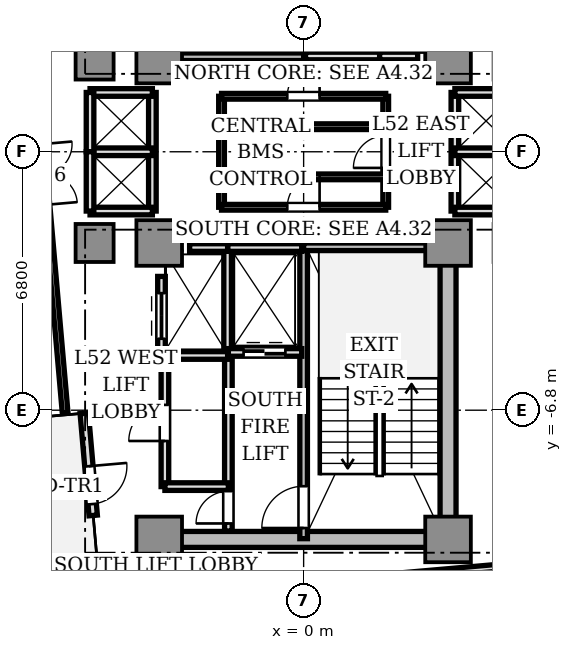
"""IFC4 building model, lengths in metres.
Left out: names, types, materials, properties, quantities, classifications, styles, units other than length and angle.
Written with IfcOpenShell. Run it as: python <this file> out.ifc"""

import sys

from ifc_helpers import new_model, si_unit, direction, frame, frame_2d, origin, origin_2d, place, context, subcontext, project, spatial, rectangle, extrude, source, transform, mapped, element, fill, save


model = new_model("IFC4")
c1 = context("Model", 3, precision=1e-05, world=origin(), true_north=direction((0.0, 1.0)))
c2 = subcontext(c1, "Body", "Model", "MODEL_VIEW")
j1 = project(units=[si_unit("LENGTHUNIT", "METRE"), si_unit("PLANEANGLEUNIT", "RADIAN")], contexts=[c1])
p1 = place(None, origin())
s1 = spatial("IfcSite", under=j1, at=p1, CompositionType="ELEMENT")
p2 = place(p1, origin())
s2 = spatial("IfcBuilding", under=s1, at=p2, CompositionType="ELEMENT")
p3 = place(p2, frame((0.0, 0.0, 188.6)))
s3 = spatial("IfcBuildingStorey", under=s2, at=p3, CompositionType="ELEMENT", Elevation=188.6)
p4 = place(p3, frame((-3.55, -10.2, 0.0), z_axis=(0.0, 0.0, 1.0), x_axis=(1.0, 0.0, 0.0)))
e1 = element("IfcWall", 1, at=p4, inside=s3, PredefinedType="SHEAR", context=c2, shape_type="SweptSolid", body=[
    extrude(rectangle(XDim=7.1, YDim=0.42, at=frame_2d((3.55, 0.0))), origin(), (0.0, 0.0, 1.0), 3.11),
])
p5 = place(p3, frame((3.8, -9.75, 0.0), z_axis=(0.0, 0.0, 1.0), x_axis=(0.0, 1.0, 0.0)))
e2 = element("IfcWall", 2, at=p5, inside=s3, PredefinedType="SHEAR", context=c2, shape_type="SweptSolid", body=[
    extrude(rectangle(XDim=6.9, YDim=0.42, at=frame_2d((3.45, 0.0))), origin(), (0.0, 0.0, 1.0), 3.11),
])
m1 = source(origin(), c2, "Body", "SweptSolid", [
    extrude(rectangle(XDim=1.2, YDim=1.2, at=origin_2d()), origin(), (0.0, 0.0, 1.0), 3.11),
])
for number, where, z_axis, x_axis in (
    (3, (-3.8, 2.4, 0.0), (0.0, 0.0, 1.0), (1.0, 0.0, 0.0)),
    (4, (3.8, 2.4, 0.0), (0.0, 0.0, 1.0), (1.0, 0.0, 0.0)),
    (5, (-3.8, -2.4, 0.0), (0.0, 0.0, 1.0), (1.0, 0.0, 0.0)),
    (6, (3.8, -2.4, 0.0), (0.0, 0.0, 1.0), (1.0, 0.0, 0.0)),
    (7, (-3.8, -10.2, 0.0), (0.0, 0.0, 1.0), (1.0, 0.0, 0.0)),
    (8, (3.8, -10.2, 0.0), (0.0, 0.0, 1.0), (1.0, 0.0, 0.0)),
):
    element("IfcColumn", number, at=place(p3, frame(where, z_axis=z_axis, x_axis=x_axis)), inside=s3, PredefinedType="COLUMN", context=c2, shape_type="MappedRepresentation", body=[
        mapped(m1, transform((0.0, 0.0, 0.0), scale=1.0)),
    ])
m2 = source(origin(), c2, "Body", "SweptSolid", [
    extrude(rectangle(XDim=1.0, YDim=1.0, at=origin_2d()), origin(), (0.0, 0.0, 1.0), 3.11),
])
for number, where, z_axis, x_axis in (
    (9, (-5.5, 2.4, 0.0), (0.0, 0.0, 1.0), (1.0, 0.0, 0.0)),
    (10, (-5.5, -2.4, 0.0), (0.0, 0.0, 1.0), (1.0, 0.0, 0.0)),
):
    element("IfcColumn", number, at=place(p3, frame(where, z_axis=z_axis, x_axis=x_axis)), inside=s3, PredefinedType="COLUMN", context=c2, shape_type="MappedRepresentation", body=[
        mapped(m2, transform((0.0, 0.0, 0.0), scale=1.0)),
    ])
p6 = place(p3, frame((-5.772, -6.879, 0.0), z_axis=(0.0, 0.0, 1.0), x_axis=(0.087168071984, -0.996193619346, 0.0)))
e11 = element("IfcWall", 11, at=p6, inside=s3, PredefinedType="STANDARD", context=c2, shape_type="SweptSolid", body=[
    extrude(rectangle(XDim=2.7, YDim=0.22, at=frame_2d((1.35, 0.0))), origin(), (0.0, 0.0, 1.0), 3.11),
])
p7 = place(p6, frame((1.4, 0.0, 0.0)))
e12 = element("IfcOpeningElement", 12, at=p7, cuts=e11, PredefinedType="OPENING", context=c2, shape_type="SweptSolid", body=[
    extrude(rectangle(XDim=1.0, YDim=2.2, at=frame_2d((0.5, 1.1))), frame((0.0, 0.12, 0.0), z_axis=(0.0, -1.0, 0.0), x_axis=(1.0, 0.0, 0.0)), (0.0, 0.0, 1.0), 0.24),
])
p8 = place(p3, frame((0.0, 2.5, 0.0), z_axis=(0.0, 0.0, 1.0), x_axis=(0.0, 1.0, 0.0)))
e13 = element("IfcWall", 13, at=p8, inside=s3, PredefinedType="SOLIDWALL", context=c2, shape_type="SweptSolid", body=[
    extrude(rectangle(XDim=7.68, YDim=0.2, at=frame_2d((3.84, 0.0))), origin(), (0.0, 0.0, 1.0), 3.11),
])
p9 = place(p8, frame((6.36, 0.0, 0.0)))
e14 = element("IfcOpeningElement", 14, at=p9, cuts=e13, PredefinedType="OPENING", context=c2, shape_type="SweptSolid", body=[
    extrude(rectangle(XDim=1.1, YDim=2.15, at=frame_2d((0.55, 1.075))), frame((0.0, 0.11, 0.0), z_axis=(0.0, -1.0, 0.0), x_axis=(1.0, 0.0, 0.0)), (0.0, 0.0, 1.0), 0.22),
])
p10 = place(p3, frame((-3.72, 2.5, 0.0), z_axis=(0.0, 0.0, 1.0), x_axis=(1.0, 0.0, 0.0)))
e15 = element("IfcWall", 15, at=p10, inside=s3, PredefinedType="SOLIDWALL", context=c2, shape_type="SweptSolid", body=[
    extrude(rectangle(XDim=3.72, YDim=0.2, at=frame_2d((1.86, 0.0))), origin(), (0.0, 0.0, 1.0), 3.11),
])
p11 = place(p3, frame((0.0, -10.18, 0.0), z_axis=(0.0, 0.0, 1.0), x_axis=(0.0, 1.0, 0.0)))
e16 = element("IfcWall", 16, at=p11, inside=s3, PredefinedType="SOLIDWALL", context=c2, shape_type="SweptSolid", body=[
    extrude(rectangle(XDim=7.68, YDim=0.2, at=frame_2d((3.84, 0.0))), origin(), (0.0, 0.0, 1.0), 3.11),
])
p12 = place(p11, frame((0.28, 0.0, 0.0)))
e17 = element("IfcOpeningElement", 17, at=p12, cuts=e16, PredefinedType="OPENING", context=c2, shape_type="SweptSolid", body=[
    extrude(rectangle(XDim=1.1, YDim=2.15, at=frame_2d((0.55, 1.075))), frame((0.0, 0.11, 0.0), z_axis=(0.0, -1.0, 0.0), x_axis=(1.0, 0.0, 0.0)), (0.0, 0.0, 1.0), 0.22),
])
p13 = place(p3, frame((0.0, -2.5, 0.0), z_axis=(0.0, 0.0, 1.0), x_axis=(1.0, 0.0, 0.0)))
e18 = element("IfcWall", 18, at=p13, inside=s3, PredefinedType="SOLIDWALL", context=c2, shape_type="SweptSolid", body=[
    extrude(rectangle(XDim=3.72, YDim=0.2, at=frame_2d((1.86, 0.0))), origin(), (0.0, 0.0, 1.0), 3.11),
])
p14 = place(p3, frame((-1.98, -9.98, 0.0), z_axis=(0.0, 0.0, 1.0), x_axis=(0.0, 1.0, 0.0)))
e19 = element("IfcWall", 19, at=p14, inside=s3, PredefinedType="SOLIDWALL", context=c2, shape_type="SweptSolid", body=[
    extrude(rectangle(XDim=4.66, YDim=0.2, at=frame_2d((2.33, 0.0))), origin(), (0.0, 0.0, 1.0), 2.66),
])
p15 = place(p14, frame((0.2, 0.0, 0.0)))
e20 = element("IfcOpeningElement", 20, at=p15, cuts=e19, PredefinedType="OPENING", context=c2, shape_type="SweptSolid", body=[
    extrude(rectangle(XDim=0.85, YDim=2.1, at=frame_2d((0.425, 1.05))), frame((0.0, 0.11, 0.0), z_axis=(0.0, -1.0, 0.0), x_axis=(1.0, 0.0, 0.0)), (0.0, 0.0, 1.0), 0.22),
])
p16 = place(p3, frame((2.0, 2.5, 0.0), z_axis=(0.0, 0.0, 1.0), x_axis=(0.0, 1.0, 0.0)))
e21 = element("IfcWall", 21, at=p16, inside=s3, PredefinedType="SOLIDWALL", context=c2, shape_type="SweptSolid", body=[
    extrude(rectangle(XDim=2.78, YDim=0.2, at=frame_2d((1.39, 0.0))), origin(), (0.0, 0.0, 1.0), 2.66),
])
p17 = place(p3, frame((0.05, 2.52, 0.0), z_axis=(0.0, 0.0, 1.0), x_axis=(1.0, 0.0, 0.0)))
e22 = element("IfcWall", 22, at=p17, inside=s3, PredefinedType="SOLIDWALL", context=c2, shape_type="SweptSolid", body=[
    extrude(rectangle(XDim=1.95, YDim=0.2, at=frame_2d((0.975, 0.0))), origin(), (0.0, 0.0, 1.0), 2.66),
])
p18 = place(p3, frame((-2.0, -5.28, 0.0), z_axis=(0.0, 0.0, 1.0), x_axis=(0.0, 1.0, 0.0)))
e23 = element("IfcWall", 23, at=p18, inside=s3, PredefinedType="SOLIDWALL", context=c2, shape_type="SweptSolid", body=[
    extrude(rectangle(XDim=2.78, YDim=0.2, at=frame_2d((1.39, 0.0))), origin(), (0.0, 0.0, 1.0), 2.66),
])
p19 = place(p3, frame((-2.0, -2.52, 0.0), z_axis=(0.0, 0.0, 1.0), x_axis=(1.0, 0.0, 0.0)))
e24 = element("IfcWall", 24, at=p19, inside=s3, PredefinedType="SOLIDWALL", context=c2, shape_type="SweptSolid", body=[
    extrude(rectangle(XDim=1.95, YDim=0.2, at=frame_2d((0.975, 0.0))), origin(), (0.0, 0.0, 1.0), 2.66),
])
p20 = place(p3, frame((-1.98, -5.28, 0.0), z_axis=(0.0, 0.0, 1.0), x_axis=(1.0, 0.0, 0.0)))
e25 = element("IfcWall", 25, at=p20, inside=s3, PredefinedType="SOLIDWALL", context=c2, shape_type="SweptSolid", body=[
    extrude(rectangle(XDim=1.93, YDim=0.2, at=frame_2d((0.965, 0.0))), origin(), (0.0, 0.0, 1.0), 2.66),
])
p21 = place(p20, frame((0.4, 0.0, 0.0)))
e26 = element("IfcOpeningElement", 26, at=p21, cuts=e25, PredefinedType="OPENING", context=c2, shape_type="SweptSolid", body=[
    extrude(rectangle(XDim=1.1, YDim=2.2, at=frame_2d((0.55, 1.1))), frame((0.0, 0.11, 0.0), z_axis=(0.0, -1.0, 0.0), x_axis=(1.0, 0.0, 0.0)), (0.0, 0.0, 1.0), 0.22),
])
for number, where, z_axis, x_axis in (
    (27, (2.0, 2.52, 0.0), (0.0, 0.0, 1.0), (1.0, 0.0, 0.0)),
    (28, (-3.0, -2.52, 0.0), (0.0, 0.0, 1.0), (1.0, 0.0, 0.0)),
):
    element("IfcWall", number, at=place(p3, frame(where, z_axis=z_axis, x_axis=x_axis)), inside=s3, PredefinedType="SOLIDWALL", context=c2, shape_type="SweptSolid", body=[
        extrude(rectangle(XDim=1.0, YDim=0.2, at=frame_2d((0.5, 0.0))), origin(), (0.0, 0.0, 1.0), 2.66),
    ])
p22 = place(p3, frame((-3.74, -5.36, 0.0), z_axis=(0.0, 0.0, 1.0), x_axis=(1.0, 0.0, 0.0)))
e29 = element("IfcWall", 29, at=p22, inside=s3, PredefinedType="SOLIDWALL", context=c2, shape_type="SweptSolid", body=[
    extrude(rectangle(XDim=1.74, YDim=0.2, at=frame_2d((0.87, 0.0))), origin(), (0.0, 0.0, 1.0), 2.66),
])
p23 = place(p3, frame((-3.74, -5.36, 0.0), z_axis=(0.0, 0.0, 1.0), x_axis=(0.0, 1.0, 0.0)))
e30 = element("IfcWall", 30, at=p23, inside=s3, PredefinedType="SOLIDWALL", context=c2, shape_type="SweptSolid", body=[
    extrude(rectangle(XDim=2.08, YDim=0.2, at=frame_2d((1.04, 0.0))), origin(), (0.0, 0.0, 1.0), 2.66),
])
p24 = place(p23, frame((0.44, 0.0, 0.0)))
e31 = element("IfcOpeningElement", 31, at=p24, cuts=e30, PredefinedType="OPENING", context=c2, shape_type="SweptSolid", body=[
    extrude(rectangle(XDim=1.2, YDim=2.2, at=frame_2d((0.6, 1.1))), frame((0.0, 0.11, 0.0), z_axis=(0.0, -1.0, 0.0), x_axis=(1.0, 0.0, 0.0)), (0.0, 0.0, 1.0), 0.22),
])
p25 = place(p3, frame((3.98, -1.56, 0.0), z_axis=(0.0, 0.0, 1.0), x_axis=(0.0, 1.0, 0.0)))
e32 = element("IfcWall", 32, at=p25, inside=s3, PredefinedType="SOLIDWALL", context=c2, shape_type="SweptSolid", body=[
    extrude(rectangle(XDim=3.12, YDim=0.2, at=frame_2d((1.56, 0.0))), origin(), (0.0, 0.0, 1.0), 2.28),
])
for number, where, z_axis, x_axis in (
    (33, (3.98, 1.56, 0.0), (0.0, 0.0, 1.0), (1.0, 0.0, 0.0)),
    (34, (3.98, -1.56, 0.0), (0.0, 0.0, 1.0), (1.0, 0.0, 0.0)),
    (35, (3.98, 0.0, 0.0), (0.0, 0.0, 1.0), (1.0, 0.0, 0.0)),
):
    element("IfcWall", number, at=place(p3, frame(where, z_axis=z_axis, x_axis=x_axis)), inside=s3, PredefinedType="SOLIDWALL", context=c2, shape_type="SweptSolid", body=[
        extrude(rectangle(XDim=1.64, YDim=0.2, at=frame_2d((0.82, 0.0))), origin(), (0.0, 0.0, 1.0), 2.66),
    ])
p26 = place(p3, frame((-3.98, -1.56, 0.0), z_axis=(0.0, 0.0, 1.0), x_axis=(0.0, 1.0, 0.0)))
e36 = element("IfcWall", 36, at=p26, inside=s3, PredefinedType="SOLIDWALL", context=c2, shape_type="SweptSolid", body=[
    extrude(rectangle(XDim=3.12, YDim=0.2, at=frame_2d((1.56, 0.0))), origin(), (0.0, 0.0, 1.0), 2.28),
])
for number, where, z_axis, x_axis in (
    (37, (-5.62, 1.56, 0.0), (0.0, 0.0, 1.0), (1.0, 0.0, 0.0)),
    (38, (-5.62, -1.56, 0.0), (0.0, 0.0, 1.0), (1.0, 0.0, 0.0)),
    (39, (-5.62, 0.0, 0.0), (0.0, 0.0, 1.0), (1.0, 0.0, 0.0)),
):
    element("IfcWall", number, at=place(p3, frame(where, z_axis=z_axis, x_axis=x_axis)), inside=s3, PredefinedType="SOLIDWALL", context=c2, shape_type="SweptSolid", body=[
        extrude(rectangle(XDim=1.64, YDim=0.2, at=frame_2d((0.82, 0.0))), origin(), (0.0, 0.0, 1.0), 2.66),
    ])
for number, where, z_axis, x_axis in (
    (40, (-5.62, 0.0, 0.0), (0.0, 0.0, 1.0), (0.0, 1.0, 0.0)),
    (41, (-5.62, -1.56, 0.0), (0.0, 0.0, 1.0), (0.0, 1.0, 0.0)),
):
    element("IfcWall", number, at=place(p3, frame(where, z_axis=z_axis, x_axis=x_axis)), inside=s3, PredefinedType="SOLIDWALL", context=c2, shape_type="SweptSolid", body=[
        extrude(rectangle(XDim=1.56, YDim=0.2, at=frame_2d((0.78, 0.0))), origin(), (0.0, 0.0, 1.0), 2.66),
    ])
p27 = place(p3, frame((-3.65, -8.81, 0.0), z_axis=(0.0, 0.0, 1.0), x_axis=(0.0, 1.0, 0.0)))
e42 = element("IfcWall", 42, at=p27, inside=s3, PredefinedType="SOLIDWALL", context=c2, shape_type="SweptSolid", body=[
    extrude(rectangle(XDim=3.43, YDim=0.2, at=frame_2d((1.715, 0.0))), origin(), (0.0, 0.0, 1.0), 2.66),
])
p28 = place(p27, frame((1.2, 0.0, 0.0)))
e43 = element("IfcOpeningElement", 43, at=p28, cuts=e42, PredefinedType="OPENING", context=c2, shape_type="SweptSolid", body=[
    extrude(rectangle(XDim=0.95, YDim=2.15, at=frame_2d((0.475, 1.075))), frame((0.0, 0.11, 0.0), z_axis=(0.0, -1.0, 0.0), x_axis=(1.0, 0.0, 0.0)), (0.0, 0.0, 1.0), 0.22),
])
p29 = place(p3, frame((-3.65, -8.81, 0.0), z_axis=(0.0, 0.0, 1.0), x_axis=(1.0, 0.0, 0.0)))
e44 = element("IfcWall", 44, at=p29, inside=s3, PredefinedType="SOLIDWALL", context=c2, shape_type="SweptSolid", body=[
    extrude(rectangle(XDim=1.67, YDim=0.2, at=frame_2d((0.835, 0.0))), origin(), (0.0, 0.0, 1.0), 2.66),
])
p30 = place(p3, frame((2.16, -1.46, 0.0), z_axis=(0.0, 0.0, 1.0), x_axis=(0.0, 1.0, 0.0)))
e45 = element("IfcWall", 45, at=p30, inside=s3, PredefinedType="PARTITIONING", context=c2, shape_type="SweptSolid", body=[
    extrude(rectangle(XDim=2.92, YDim=0.15, at=frame_2d((1.46, 0.0))), origin(), (0.0, 0.0, 1.0), 2.66),
])
p31 = place(p30, frame((1.035, 0.0, 0.0)))
e46 = element("IfcOpeningElement", 46, at=p31, cuts=e45, PredefinedType="OPENING", context=c2, shape_type="SweptSolid", body=[
    extrude(rectangle(XDim=0.85, YDim=2.1, at=frame_2d((0.425, 1.05))), frame((0.0, 0.085, 0.0), z_axis=(0.0, -1.0, 0.0), x_axis=(1.0, 0.0, 0.0)), (0.0, 0.0, 1.0), 0.17),
])
p32 = place(p3, frame((-2.16, -1.46, 0.0), z_axis=(0.0, 0.0, 1.0), x_axis=(0.0, 1.0, 0.0)))
e47 = element("IfcWall", 47, at=p32, inside=s3, PredefinedType="PARTITIONING", context=c2, shape_type="SweptSolid", body=[
    extrude(rectangle(XDim=2.92, YDim=0.15, at=frame_2d((1.46, 0.0))), origin(), (0.0, 0.0, 1.0), 2.66),
])
p33 = place(p3, frame((-2.16, 1.46, 0.0), z_axis=(0.0, 0.0, 1.0), x_axis=(1.0, 0.0, 0.0)))
e48 = element("IfcWall", 48, at=p33, inside=s3, PredefinedType="PARTITIONING", context=c2, shape_type="SweptSolid", body=[
    extrude(rectangle(XDim=4.32, YDim=0.15, at=frame_2d((2.16, 0.0))), origin(), (0.0, 0.0, 1.0), 2.66),
])
p34 = place(p33, frame((1.73, 0.0, 0.0)))
e49 = element("IfcOpeningElement", 49, at=p34, cuts=e48, PredefinedType="OPENING", context=c2, shape_type="SweptSolid", body=[
    extrude(rectangle(XDim=0.85, YDim=2.1, at=frame_2d((0.425, 1.05))), frame((0.0, 0.085, 0.0), z_axis=(0.0, -1.0, 0.0), x_axis=(1.0, 0.0, 0.0)), (0.0, 0.0, 1.0), 0.17),
])
p35 = place(p3, frame((-2.16, -1.46, 0.0), z_axis=(0.0, 0.0, 1.0), x_axis=(1.0, 0.0, 0.0)))
e50 = element("IfcWall", 50, at=p35, inside=s3, PredefinedType="PARTITIONING", context=c2, shape_type="SweptSolid", body=[
    extrude(rectangle(XDim=4.32, YDim=0.15, at=frame_2d((2.16, 0.0))), origin(), (0.0, 0.0, 1.0), 2.66),
])
p36 = place(p35, frame((1.73, 0.0, 0.0)))
e51 = element("IfcOpeningElement", 51, at=p36, cuts=e50, PredefinedType="OPENING", context=c2, shape_type="SweptSolid", body=[
    extrude(rectangle(XDim=0.85, YDim=2.1, at=frame_2d((0.425, 1.05))), frame((0.0, 0.085, 0.0), z_axis=(0.0, -1.0, 0.0), x_axis=(1.0, 0.0, 0.0)), (0.0, 0.0, 1.0), 0.17),
])
for number, where, z_axis, x_axis in (
    (52, (-2.16, 0.66, 0.0), (0.0, 0.0, 1.0), (1.0, 0.0, 0.0)),
    (53, (-2.16, -0.66, 0.0), (0.0, 0.0, 1.0), (1.0, 0.0, 0.0)),
):
    element("IfcWall", number, at=place(p3, frame(where, z_axis=z_axis, x_axis=x_axis)), inside=s3, PredefinedType="PARTITIONING", context=c2, shape_type="SweptSolid", body=[
        extrude(rectangle(XDim=4.32, YDim=0.15, at=frame_2d((2.16, 0.0))), origin(), (0.0, 0.0, 1.0), 2.66),
    ])
p37 = place(p3, frame((-7.373, 5.679, 0.0), z_axis=(0.0, 0.0, 1.0), x_axis=(0.087154691724, -0.996194790044, 0.0)))
e54 = element("IfcWall", 54, at=p37, inside=s3, PredefinedType="PARTITIONING", context=c2, shape_type="SweptSolid", body=[
    extrude(rectangle(XDim=12.6, YDim=0.15, at=frame_2d((6.3, 0.0))), origin(), (0.0, 0.0, 1.0), 2.66),
])
p38 = place(p37, frame((5.5, 0.0, 0.0)))
e55 = element("IfcOpeningElement", 55, at=p38, cuts=e54, PredefinedType="OPENING", context=c2, shape_type="SweptSolid", body=[
    extrude(rectangle(XDim=1.6, YDim=2.25, at=frame_2d((0.8, 1.125))), frame((0.0, 0.085, 0.0), z_axis=(0.0, -1.0, 0.0), x_axis=(1.0, 0.0, 0.0)), (0.0, 0.0, 1.0), 0.17),
])
p39 = place(p3, frame((1.936, -11.224, 0.0), z_axis=(0.0, 0.0, 1.0), x_axis=(0.996194212812, 0.087161289348, 0.0)))
e56 = element("IfcWall", 56, at=p39, inside=s3, PredefinedType="PARTITIONING", context=c2, shape_type="SweptSolid", body=[
    extrude(rectangle(XDim=5.35, YDim=0.18, at=frame_2d((2.675, 0.0))), origin(), (0.0, 0.0, 1.0), 2.66),
])
m3 = source(origin(), c2, "Body", "SweptSolid", [
    extrude(rectangle(XDim=1.0, YDim=0.05, at=origin_2d()), origin(), (0.0, 0.0, 1.0), 2.2),
])
p40 = place(p7, frame((0.5, 0.0, 0.0)))
e57 = element("IfcDoor", 57, at=p40, inside=s3, OperationType="SINGLE_SWING_LEFT", PredefinedType="DOOR", context=c2, shape_type="MappedRepresentation", body=[
    mapped(m3, transform((0.0, 0.0, 0.0), scale=1.0)),
])
fill(e12, e57)
m4 = source(origin(), c2, "Body", "SweptSolid", [
    extrude(rectangle(XDim=1.1, YDim=0.05, at=origin_2d()), origin(), (0.0, 0.0, 1.0), 2.15),
])
p41 = place(p12, frame((0.55, 0.0, 0.0)))
e58 = element("IfcDoor", 58, at=p41, inside=s3, OperationType="SINGLE_SWING_LEFT", PredefinedType="DOOR", context=c2, shape_type="MappedRepresentation", body=[
    mapped(m4, transform((0.0, 0.0, 0.0), scale=1.0)),
])
fill(e17, e58)
m5 = source(origin(), c2, "Body", "SweptSolid", [
    extrude(rectangle(XDim=0.85, YDim=0.05, at=origin_2d()), origin(), (0.0, 0.0, 1.0), 2.1),
])
p42 = place(p15, frame((0.425, 0.0, 0.0)))
e59 = element("IfcDoor", 59, at=p42, inside=s3, OperationType="SINGLE_SWING_LEFT", PredefinedType="DOOR", context=c2, shape_type="MappedRepresentation", body=[
    mapped(m5, transform((0.0, 0.0, 0.0), scale=1.0)),
])
fill(e20, e59)
m6 = source(origin(), c2, "Body", "SweptSolid", [
    extrude(rectangle(XDim=1.1, YDim=0.05, at=origin_2d()), origin(), (0.0, 0.0, 1.0), 2.2),
])
p43 = place(p21, frame((0.55, 0.0, 0.0)))
e60 = element("IfcDoor", 60, at=p43, inside=s3, OperationType="DOUBLE_DOOR_SLIDING", PredefinedType="DOOR", context=c2, shape_type="MappedRepresentation", body=[
    mapped(m6, transform((0.0, 0.0, 0.0), scale=1.0)),
])
fill(e26, e60)
m7 = source(origin(), c2, "Body", "SweptSolid", [
    extrude(rectangle(XDim=1.2, YDim=0.05, at=origin_2d()), origin(), (0.0, 0.0, 1.0), 2.2),
])
p44 = place(p24, frame((0.6, 0.0, 0.0)))
e61 = element("IfcDoor", 61, at=p44, inside=s3, OperationType="DOUBLE_DOOR_SLIDING", PredefinedType="DOOR", context=c2, shape_type="MappedRepresentation", body=[
    mapped(m7, transform((0.0, 0.0, 0.0), scale=1.0)),
])
fill(e31, e61)
m8 = source(origin(), c2, "Body", "SweptSolid", [
    extrude(rectangle(XDim=0.95, YDim=0.05, at=origin_2d()), origin(), (0.0, 0.0, 1.0), 2.15),
])
p45 = place(p28, frame((0.475, 0.0, 0.0)))
e62 = element("IfcDoor", 62, at=p45, inside=s3, OperationType="SINGLE_SWING_LEFT", PredefinedType="DOOR", context=c2, shape_type="MappedRepresentation", body=[
    mapped(m8, transform((0.0, 0.0, 0.0), scale=1.0)),
])
fill(e43, e62)
p46 = place(p34, frame((0.425, 0.0, 0.0)))
e63 = element("IfcDoor", 63, at=p46, inside=s3, OperationType="SINGLE_SWING_RIGHT", PredefinedType="DOOR", context=c2, shape_type="MappedRepresentation", body=[
    mapped(m5, transform((0.0, 0.0, 0.0), scale=1.0)),
])
fill(e49, e63)
p47 = place(p31, frame((0.425, 0.0, 0.0)))
e64 = element("IfcDoor", 64, at=p47, inside=s3, OperationType="SINGLE_SWING_LEFT", PredefinedType="DOOR", context=c2, shape_type="MappedRepresentation", body=[
    mapped(m5, transform((0.0, 0.0, 0.0), scale=1.0)),
])
fill(e46, e64)
p48 = place(p36, frame((0.425, 0.0, 0.0)))
e65 = element("IfcDoor", 65, at=p48, inside=s3, OperationType="SINGLE_SWING_RIGHT", PredefinedType="DOOR", context=c2, shape_type="MappedRepresentation", body=[
    mapped(m5, transform((0.0, 0.0, 0.0), scale=1.0)),
])
fill(e51, e65)
save(model, sys.argv[1])
